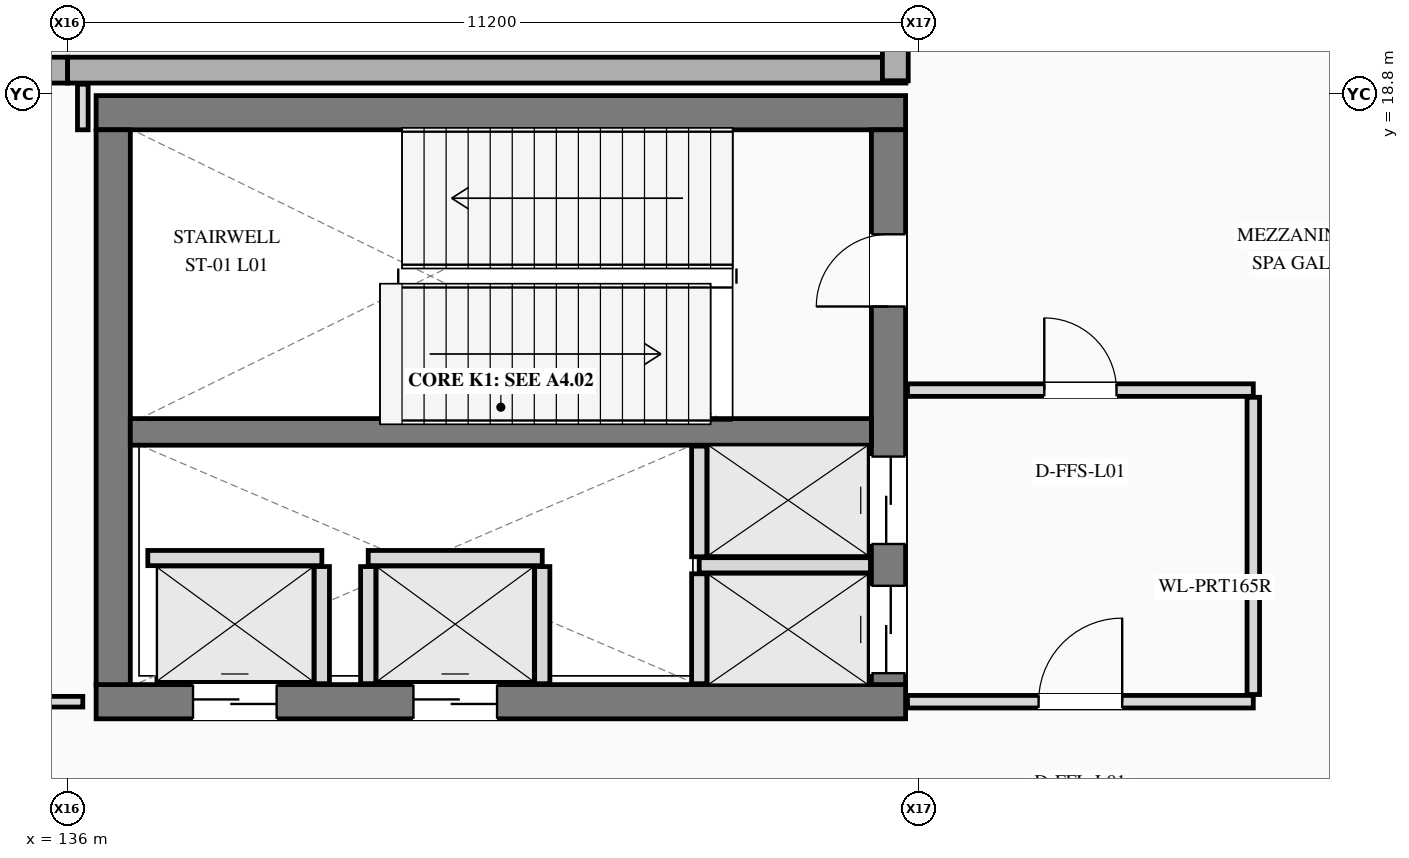
"""IFC4 building model, lengths in metres.
Left out: names, types, materials, properties, quantities, classifications, styles, units other than length and angle.
Written with IfcOpenShell. Run it as: python <this file> out.ifc"""

import sys

from ifc_helpers import new_model, si_unit, direction, frame, frame_2d, origin, place, context, subcontext, project, spatial, rectangle, extrude, element, fill, save


model = new_model("IFC4")
c1 = context("Model", 3, precision=1e-05, world=origin(), true_north=direction((0.0, 1.0)))
c2 = subcontext(c1, "Body", "Model", "MODEL_VIEW")
j1 = project(units=[si_unit("LENGTHUNIT", "METRE"), si_unit("PLANEANGLEUNIT", "RADIAN")], contexts=[c1])
p1 = place(None, origin())
s1 = spatial("IfcSite", under=j1, at=p1, CompositionType="ELEMENT")
p2 = place(p1, origin())
s2 = spatial("IfcBuilding", under=s1, at=p2, CompositionType="ELEMENT")
p3 = place(p2, frame((0.0, 0.0, 5.4)))
s3 = spatial("IfcBuildingStorey", under=s2, at=p3, CompositionType="ELEMENT", Elevation=5.4)
p4 = place(p3, frame((136.0, 19.11, 0.0), z_axis=(0.0, 0.0, 1.0), x_axis=(-1.0, 0.0, 0.0)))
e1 = element("IfcWall", 1, at=p4, inside=s3, PredefinedType="STANDARD", context=c2, shape_type="SweptSolid", body=[
    extrude(rectangle(XDim=12.0, YDim=0.34, at=frame_2d((6.0, 0.0))), origin(), (0.0, 0.0, 1.0), 5.4),
])
p5 = place(p4, frame((4.95, 0.0, 0.88)))
e2 = element("IfcOpeningElement", 2, at=p5, cuts=e1, PredefinedType="OPENING", context=c2, shape_type="SweptSolid", body=[
    extrude(rectangle(XDim=2.1, YDim=1.9, at=frame_2d((1.05, 0.95))), frame((0.0, 0.18, 0.0), z_axis=(0.0, -1.0, 0.0), x_axis=(1.0, 0.0, 0.0)), (0.0, 0.0, 1.0), 0.36),
])
p6 = place(p3, frame((147.03, 19.11, 0.0), z_axis=(0.0, 0.0, 1.0), x_axis=(-1.0, 0.0, 0.0)))
e3 = element("IfcWall", 3, at=p6, inside=s3, PredefinedType="STANDARD", context=c2, shape_type="SweptSolid", body=[
    extrude(rectangle(XDim=11.03, YDim=0.34, at=frame_2d((5.515, 0.0))), origin(), (0.0, 0.0, 1.0), 5.4),
])
p7 = place(p3, frame((146.89, 18.97, 0.0), z_axis=(0.0, 0.0, 1.0), x_axis=(0.0, 1.0, 0.0)))
e4 = element("IfcWall", 4, at=p7, inside=s3, PredefinedType="STANDARD", context=c2, shape_type="SweptSolid", body=[
    extrude(rectangle(XDim=6.08, YDim=0.34, at=frame_2d((3.04, 0.0))), origin(), (0.0, 0.0, 1.0), 5.4),
])
p8 = place(p7, frame((1.5, 0.0, 0.9)))
e5 = element("IfcOpeningElement", 5, at=p8, cuts=e4, PredefinedType="OPENING", context=c2, shape_type="SweptSolid", body=[
    extrude(rectangle(XDim=1.5, YDim=1.7, at=frame_2d((0.75, 0.85))), frame((0.0, 0.18, 0.0), z_axis=(0.0, -1.0, 0.0), x_axis=(1.0, 0.0, 0.0)), (0.0, 0.0, 1.0), 0.36),
])
p9 = place(p3, frame((136.375, 10.8, 0.0), z_axis=(0.0, 0.0, 1.0), x_axis=(1.0, 0.0, 0.0)))
e6 = element("IfcWall", 6, at=p9, inside=s3, PredefinedType="SHEAR", context=c2, shape_type="SweptSolid", body=[
    extrude(rectangle(XDim=10.65, YDim=0.45, at=frame_2d((5.325, 0.0))), origin(), (0.0, 0.0, 1.0), 5.4),
])
p10 = place(p9, frame((1.275, 0.0, 0.0)))
e7 = element("IfcOpeningElement", 7, at=p10, cuts=e6, PredefinedType="OPENING", context=c2, shape_type="SweptSolid", body=[
    extrude(rectangle(XDim=1.1, YDim=2.2, at=frame_2d((0.55, 1.1))), frame((0.0, 0.235, 0.0), z_axis=(0.0, -1.0, 0.0), x_axis=(1.0, 0.0, 0.0)), (0.0, 0.0, 1.0), 0.47),
])
p11 = place(p9, frame((4.175, 0.0, 0.0)))
e8 = element("IfcOpeningElement", 8, at=p11, cuts=e6, PredefinedType="OPENING", context=c2, shape_type="SweptSolid", body=[
    extrude(rectangle(XDim=1.1, YDim=2.2, at=frame_2d((0.55, 1.1))), frame((0.0, 0.235, 0.0), z_axis=(0.0, -1.0, 0.0), x_axis=(1.0, 0.0, 0.0)), (0.0, 0.0, 1.0), 0.47),
])
p12 = place(p3, frame((147.025, 18.55, 0.0), z_axis=(0.0, 0.0, 1.0), x_axis=(-1.0, 0.0, 0.0)))
e9 = element("IfcWall", 9, at=p12, inside=s3, PredefinedType="SHEAR", context=c2, shape_type="SweptSolid", body=[
    extrude(rectangle(XDim=10.65, YDim=0.45, at=frame_2d((5.325, 0.0))), origin(), (0.0, 0.0, 1.0), 5.4),
])
p13 = place(p3, frame((136.6, 18.325, 0.0), z_axis=(0.0, 0.0, 1.0), x_axis=(0.0, -1.0, 0.0)))
e10 = element("IfcWall", 10, at=p13, inside=s3, PredefinedType="SHEAR", context=c2, shape_type="SweptSolid", body=[
    extrude(rectangle(XDim=7.3, YDim=0.45, at=frame_2d((3.65, 0.0))), origin(), (0.0, 0.0, 1.0), 5.4),
])
p14 = place(p3, frame((146.8, 11.025, 0.0), z_axis=(0.0, 0.0, 1.0), x_axis=(0.0, 1.0, 0.0)))
e11 = element("IfcWall", 11, at=p14, inside=s3, PredefinedType="SHEAR", context=c2, shape_type="SweptSolid", body=[
    extrude(rectangle(XDim=7.3, YDim=0.45, at=frame_2d((3.65, 0.0))), origin(), (0.0, 0.0, 1.0), 5.4),
])
p15 = place(p14, frame((4.975, 0.0, 0.0)))
e12 = element("IfcOpeningElement", 12, at=p15, cuts=e11, PredefinedType="OPENING", context=c2, shape_type="SweptSolid", body=[
    extrude(rectangle(XDim=0.95, YDim=2.2, at=frame_2d((0.475, 1.1))), frame((0.0, 0.235, 0.0), z_axis=(0.0, -1.0, 0.0), x_axis=(1.0, 0.0, 0.0)), (0.0, 0.0, 1.0), 0.47),
])
p16 = place(p14, frame((0.15, 0.0, 0.0)))
e13 = element("IfcOpeningElement", 13, at=p16, cuts=e11, PredefinedType="OPENING", context=c2, shape_type="SweptSolid", body=[
    extrude(rectangle(XDim=1.15, YDim=2.25, at=frame_2d((0.575, 1.125))), frame((0.0, 0.235, 0.0), z_axis=(0.0, -1.0, 0.0), x_axis=(1.0, 0.0, 0.0)), (0.0, 0.0, 1.0), 0.47),
])
p17 = place(p14, frame((1.85, 0.0, 0.0)))
e14 = element("IfcOpeningElement", 14, at=p17, cuts=e11, PredefinedType="OPENING", context=c2, shape_type="SweptSolid", body=[
    extrude(rectangle(XDim=1.15, YDim=2.25, at=frame_2d((0.575, 1.125))), frame((0.0, 0.235, 0.0), z_axis=(0.0, -1.0, 0.0), x_axis=(1.0, 0.0, 0.0)), (0.0, 0.0, 1.0), 0.47),
])
p18 = place(p3, frame((136.825, 14.35, 0.0), z_axis=(0.0, 0.0, 1.0), x_axis=(1.0, 0.0, 0.0)))
e15 = element("IfcWall", 15, at=p18, inside=s3, PredefinedType="SHEAR", context=c2, shape_type="SweptSolid", body=[
    extrude(rectangle(XDim=9.75, YDim=0.35, at=frame_2d((4.875, 0.0))), origin(), (0.0, 0.0, 1.0), 5.4),
])
p19 = place(p3, frame((137.055, 12.69, 0.0), z_axis=(0.0, 0.0, 1.0), x_axis=(1.0, 0.0, 0.0)))
e16 = element("IfcWall", 16, at=p19, inside=s3, PredefinedType="PLUMBINGWALL", context=c2, shape_type="SweptSolid", body=[
    extrude(rectangle(XDim=2.29, YDim=0.2, at=frame_2d((1.145, 0.0))), origin(), (0.0, 0.0, 1.0), 5.095),
])
p20 = place(p3, frame((139.345, 11.037, 0.0), z_axis=(0.0, 0.0, 1.0), x_axis=(0.0, 1.0, 0.0)))
e17 = element("IfcWall", 17, at=p20, inside=s3, PredefinedType="PLUMBINGWALL", context=c2, shape_type="SweptSolid", body=[
    extrude(rectangle(XDim=1.541, YDim=0.2, at=frame_2d((0.771, 0.0))), origin(), (0.0, 0.0, 1.0), 5.095),
])
p21 = place(p3, frame((139.955, 12.69, 0.0), z_axis=(0.0, 0.0, 1.0), x_axis=(1.0, 0.0, 0.0)))
e18 = element("IfcWall", 18, at=p21, inside=s3, PredefinedType="PLUMBINGWALL", context=c2, shape_type="SweptSolid", body=[
    extrude(rectangle(XDim=2.29, YDim=0.2, at=frame_2d((1.145, 0.0))), origin(), (0.0, 0.0, 1.0), 5.095),
])
for number, where, z_axis, x_axis in (
    (19, (139.955, 11.037, 0.0), (0.0, 0.0, 1.0), (0.0, 1.0, 0.0)),
    (20, (142.245, 11.037, 0.0), (0.0, 0.0, 1.0), (0.0, 1.0, 0.0)),
):
    element("IfcWall", number, at=place(p3, frame(where, z_axis=z_axis, x_axis=x_axis)), inside=s3, PredefinedType="PLUMBINGWALL", context=c2, shape_type="SweptSolid", body=[
        extrude(rectangle(XDim=1.541, YDim=0.2, at=frame_2d((0.771, 0.0))), origin(), (0.0, 0.0, 1.0), 5.095),
    ])
p22 = place(p3, frame((144.31, 12.595, 0.0), z_axis=(0.0, 0.0, 1.0), x_axis=(1.0, 0.0, 0.0)))
e21 = element("IfcWall", 21, at=p22, inside=s3, PredefinedType="PLUMBINGWALL", context=c2, shape_type="SweptSolid", body=[
    extrude(rectangle(XDim=2.253, YDim=0.2, at=frame_2d((1.126, 0.0))), origin(), (0.0, 0.0, 1.0), 5.095),
])
p23 = place(p3, frame((144.31, 11.037, 0.0), z_axis=(0.0, 0.0, 1.0), x_axis=(0.0, 1.0, 0.0)))
e22 = element("IfcWall", 22, at=p23, inside=s3, PredefinedType="PLUMBINGWALL", context=c2, shape_type="SweptSolid", body=[
    extrude(rectangle(XDim=1.446, YDim=0.2, at=frame_2d((0.723, 0.0))), origin(), (0.0, 0.0, 1.0), 5.095),
])
p24 = place(p3, frame((144.31, 12.707, 0.0), z_axis=(0.0, 0.0, 1.0), x_axis=(0.0, 1.0, 0.0)))
e23 = element("IfcWall", 23, at=p24, inside=s3, PredefinedType="PLUMBINGWALL", context=c2, shape_type="SweptSolid", body=[
    extrude(rectangle(XDim=1.456, YDim=0.2, at=frame_2d((0.728, 0.0))), origin(), (0.0, 0.0, 1.0), 5.095),
])
p25 = place(p3, frame((147.05, 10.8, 0.0), z_axis=(0.0, 0.0, 1.0), x_axis=(1.0, 0.0, 0.0)))
e24 = element("IfcWall", 24, at=p25, inside=s3, PredefinedType="PARTITIONING", context=c2, shape_type="SweptSolid", body=[
    extrude(rectangle(XDim=4.55, YDim=0.165, at=frame_2d((2.275, 0.0))), origin(), (0.0, 0.0, 1.0), 5.095),
])
p26 = place(p25, frame((1.725, 0.0, 0.0)))
e25 = element("IfcOpeningElement", 25, at=p26, cuts=e24, PredefinedType="OPENING", context=c2, shape_type="SweptSolid", body=[
    extrude(rectangle(XDim=1.1, YDim=2.2, at=frame_2d((0.55, 1.1))), frame((0.0, 0.093, 0.0), z_axis=(0.0, -1.0, 0.0), x_axis=(1.0, 0.0, 0.0)), (0.0, 0.0, 1.0), 0.185),
])
p27 = place(p3, frame((147.05, 14.9, 0.0), z_axis=(0.0, 0.0, 1.0), x_axis=(1.0, 0.0, 0.0)))
e26 = element("IfcWall", 26, at=p27, inside=s3, PredefinedType="PARTITIONING", context=c2, shape_type="SweptSolid", body=[
    extrude(rectangle(XDim=4.55, YDim=0.165, at=frame_2d((2.275, 0.0))), origin(), (0.0, 0.0, 1.0), 5.095),
])
p28 = place(p27, frame((1.8, 0.0, 0.0)))
e27 = element("IfcOpeningElement", 27, at=p28, cuts=e26, PredefinedType="OPENING", context=c2, shape_type="SweptSolid", body=[
    extrude(rectangle(XDim=0.95, YDim=2.2, at=frame_2d((0.475, 1.1))), frame((0.0, 0.093, 0.0), z_axis=(0.0, -1.0, 0.0), x_axis=(1.0, 0.0, 0.0)), (0.0, 0.0, 1.0), 0.185),
])
p29 = place(p3, frame((151.6, 10.895, 0.0), z_axis=(0.0, 0.0, 1.0), x_axis=(0.0, 1.0, 0.0)))
e28 = element("IfcWall", 28, at=p29, inside=s3, PredefinedType="PARTITIONING", context=c2, shape_type="SweptSolid", body=[
    extrude(rectangle(XDim=3.911, YDim=0.165, at=frame_2d((1.956, 0.0))), origin(), (0.0, 0.0, 1.0), 5.095),
])
p30 = place(p3, frame((104.0, 10.8, 0.0), z_axis=(0.0, 0.0, 1.0), x_axis=(1.0, 0.0, 0.0)))
e29 = element("IfcWall", 29, at=p30, inside=s3, PredefinedType="PARTITIONING", context=c2, shape_type="SweptSolid", body=[
    extrude(rectangle(XDim=32.2, YDim=0.14, at=frame_2d((16.1, 0.0))), origin(), (0.0, 0.0, 1.0), 4.424),
])
p31 = place(p30, frame((13.2, 0.0, 0.0)))
e30 = element("IfcOpeningElement", 30, at=p31, cuts=e29, PredefinedType="OPENING", context=c2, shape_type="SweptSolid", body=[
    extrude(rectangle(XDim=1.6, YDim=2.4, at=frame_2d((0.8, 1.2))), frame((0.0, 0.08, 0.0), z_axis=(0.0, -1.0, 0.0), x_axis=(1.0, 0.0, 0.0)), (0.0, 0.0, 1.0), 0.16),
])
p32 = place(p3, frame((136.2, 18.325, 0.0), z_axis=(0.0, 0.0, 1.0), x_axis=(0.0, 1.0, 0.0)))
e31 = element("IfcWall", 31, at=p32, inside=s3, PredefinedType="PARTITIONING", context=c2, shape_type="SweptSolid", body=[
    extrude(rectangle(XDim=0.6, YDim=0.14, at=frame_2d((0.3, 0.0))), origin(), (0.0, 0.0, 1.0), 5.095),
])
p33 = place(p15, origin())
e32 = element("IfcDoor", 32, at=p33, inside=s3, OperationType="SINGLE_SWING_LEFT", PredefinedType="DOOR", context=c2, shape_type="SweptSolid", body=[
    extrude(rectangle(XDim=0.95, YDim=2.2, at=frame_2d((0.475, 1.1))), frame((0.0, 0.025, 0.0), z_axis=(0.0, -1.0, 0.0), x_axis=(1.0, 0.0, 0.0)), (0.0, 0.0, 1.0), 0.05),
])
fill(e12, e32)
p34 = place(p10, origin())
e33 = element("IfcDoor", 33, at=p34, inside=s3, OperationType="SLIDING_TO_LEFT", PredefinedType="DOOR", context=c2, shape_type="SweptSolid", body=[
    extrude(rectangle(XDim=1.1, YDim=2.2, at=frame_2d((0.55, 1.1))), frame((0.0, 0.025, 0.0), z_axis=(0.0, -1.0, 0.0), x_axis=(1.0, 0.0, 0.0)), (0.0, 0.0, 1.0), 0.05),
])
fill(e7, e33)
p35 = place(p11, origin())
e34 = element("IfcDoor", 34, at=p35, inside=s3, OperationType="SLIDING_TO_RIGHT", PredefinedType="DOOR", context=c2, shape_type="SweptSolid", body=[
    extrude(rectangle(XDim=1.1, YDim=2.2, at=frame_2d((0.55, 1.1))), frame((0.0, 0.025, 0.0), z_axis=(0.0, -1.0, 0.0), x_axis=(1.0, 0.0, 0.0)), (0.0, 0.0, 1.0), 0.05),
])
fill(e8, e34)
p36 = place(p16, origin())
e35 = element("IfcDoor", 35, at=p36, inside=s3, OperationType="SLIDING_TO_LEFT", PredefinedType="DOOR", context=c2, shape_type="SweptSolid", body=[
    extrude(rectangle(XDim=1.15, YDim=2.25, at=frame_2d((0.575, 1.125))), frame((0.0, 0.025, 0.0), z_axis=(0.0, -1.0, 0.0), x_axis=(1.0, 0.0, 0.0)), (0.0, 0.0, 1.0), 0.05),
])
fill(e13, e35)
p37 = place(p17, origin())
e36 = element("IfcDoor", 36, at=p37, inside=s3, OperationType="SLIDING_TO_RIGHT", PredefinedType="DOOR", context=c2, shape_type="SweptSolid", body=[
    extrude(rectangle(XDim=1.15, YDim=2.25, at=frame_2d((0.575, 1.125))), frame((0.0, 0.025, 0.0), z_axis=(0.0, -1.0, 0.0), x_axis=(1.0, 0.0, 0.0)), (0.0, 0.0, 1.0), 0.05),
])
fill(e14, e36)
p38 = place(p26, origin())
e37 = element("IfcDoor", 37, at=p38, inside=s3, OperationType="SINGLE_SWING_RIGHT", PredefinedType="DOOR", context=c2, shape_type="SweptSolid", body=[
    extrude(rectangle(XDim=1.1, YDim=2.2, at=frame_2d((0.55, 1.1))), frame((0.0, 0.025, 0.0), z_axis=(0.0, -1.0, 0.0), x_axis=(1.0, 0.0, 0.0)), (0.0, 0.0, 1.0), 0.05),
])
fill(e25, e37)
p39 = place(p28, origin())
e38 = element("IfcDoor", 38, at=p39, inside=s3, OperationType="SINGLE_SWING_LEFT", PredefinedType="DOOR", context=c2, shape_type="SweptSolid", body=[
    extrude(rectangle(XDim=0.95, YDim=2.2, at=frame_2d((0.475, 1.1))), frame((0.0, 0.025, 0.0), z_axis=(0.0, -1.0, 0.0), x_axis=(1.0, 0.0, 0.0)), (0.0, 0.0, 1.0), 0.05),
])
fill(e27, e38)
save(model, sys.argv[1])
